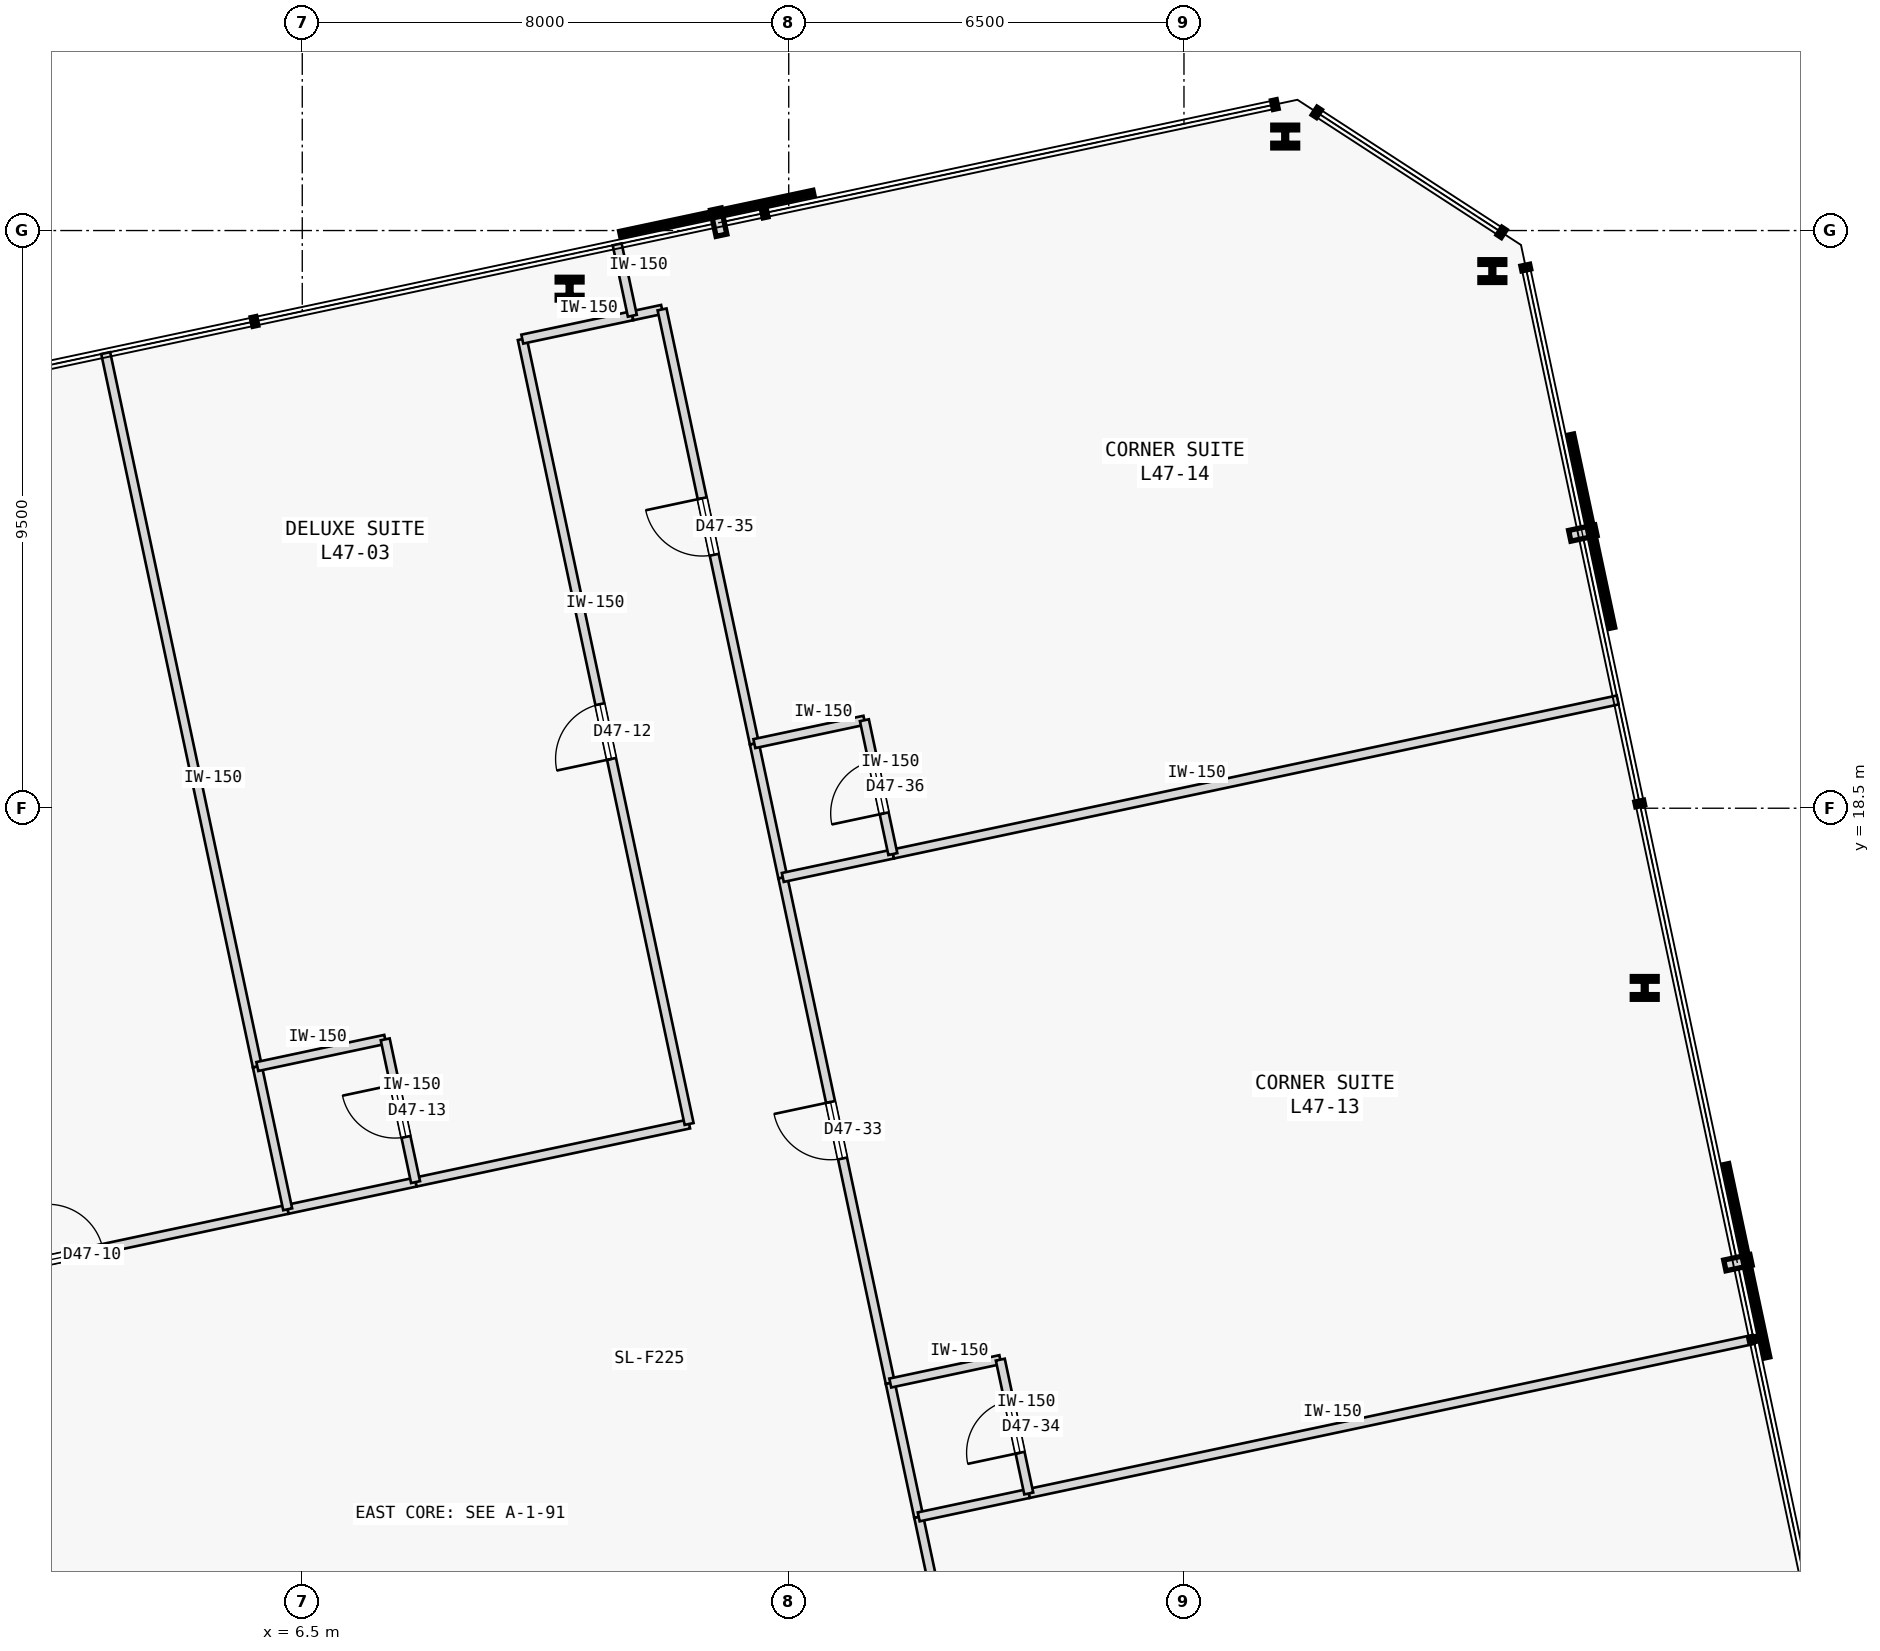
"""IFC4 building model, lengths in metres.
Left out: names, types, materials, properties, quantities, classifications, styles, units other than length and angle.
Written with IfcOpenShell. Run it as: python <this file> out.ifc"""

import sys

from ifc_helpers import new_model, si_unit, direction, frame, frame_2d, origin, origin_2d, place, context, subcontext, project, spatial, rectangle, i_section, extrude, element, fill, save


model = new_model("IFC4")
c1 = context("Model", 3, precision=1e-05, world=origin(), true_north=direction((0.0, 1.0)))
c2 = subcontext(c1, "Body", "Model", "MODEL_VIEW")
j1 = project(units=[si_unit("LENGTHUNIT", "METRE"), si_unit("PLANEANGLEUNIT", "RADIAN")], contexts=[c1])
p1 = place(None, origin())
s1 = spatial("IfcSite", under=j1, at=p1, CompositionType="ELEMENT")
p2 = place(p1, origin())
s2 = spatial("IfcBuilding", under=s1, at=p2, CompositionType="ELEMENT")
p3 = place(p2, frame((0.0, 0.0, 182.0)))
s3 = spatial("IfcBuildingStorey", under=s2, at=p3, CompositionType="ELEMENT", Elevation=182.0)
for number, where, z_axis, x_axis in (
    (1, (28.577, 15.545, 0.0), (0.0, 0.0, 1.0), (1.0, 0.0, 0.0)),
    (2, (26.071, 27.333, 0.0), (0.0, 0.0, 1.0), (1.0, 0.0, 0.0)),
    (3, (22.665, 29.546, 0.0), (0.0, 0.0, 1.0), (1.0, 0.0, 0.0)),
    (4, (10.896, 27.044, 0.0), (0.0, 0.0, 1.0), (1.0, 0.0, 0.0)),
):
    element("IfcColumn", number, at=place(p3, frame(where, z_axis=z_axis, x_axis=x_axis)), inside=s3, PredefinedType="COLUMN", context=c2, shape_type="SweptSolid", body=[
        extrude(i_section(OverallWidth=0.409, OverallDepth=0.374, WebThickness=0.048, FlangeThickness=0.077, FilletRadius=0.015, at=origin_2d()), origin(), (0.0, 0.0, 1.0), 3.4),
    ])
p4 = place(p3, frame((-0.72, 10.421, 0.0), z_axis=(0.0, 0.0, 1.0), x_axis=(0.978147545754, 0.207911949477, 0.0)))
e5 = element("IfcWall", 5, at=p4, inside=s3, PredefinedType="PARTITIONING", context=c2, shape_type="SweptSolid", body=[
    extrude(rectangle(XDim=7.136, YDim=0.15, at=frame_2d((3.568, 0.0))), origin(), (0.0, 0.0, 1.0), 3.175),
])
p5 = place(p4, frame((3.108, 0.0, 0.0)))
e6 = element("IfcOpeningElement", 6, at=p5, cuts=e5, PredefinedType="OPENING", context=c2, shape_type="SweptSolid", body=[
    extrude(rectangle(XDim=0.92, YDim=2.15, at=frame_2d((0.46, 1.075))), frame((0.0, 0.085, 0.0), z_axis=(0.0, -1.0, 0.0), x_axis=(1.0, 0.0, 0.0)), (0.0, 0.0, 1.0), 0.17),
])
p6 = place(p3, frame((8.363, 12.352, 0.0), z_axis=(0.0, 0.0, 1.0), x_axis=(0.978153723809, 0.20788288193, 0.0)))
e7 = element("IfcWall", 7, at=p6, inside=s3, PredefinedType="PARTITIONING", context=c2, shape_type="SweptSolid", body=[
    extrude(rectangle(XDim=4.599, YDim=0.15, at=frame_2d((2.3, 0.0))), origin(), (0.0, 0.0, 1.0), 3.175),
])
p7 = place(p3, frame((12.862, 13.308, 0.0), z_axis=(0.0, 0.0, 1.0), x_axis=(-0.207911421929, 0.978147657888, 0.0)))
e8 = element("IfcWall", 8, at=p7, inside=s3, PredefinedType="PARTITIONING", context=c2, shape_type="SweptSolid", body=[
    extrude(rectangle(XDim=13.195, YDim=0.15, at=frame_2d((6.598, 0.0))), origin(), (0.0, 0.0, 1.0), 3.175),
])
p8 = place(p7, frame((6.137, 0.0, 0.0)))
e9 = element("IfcOpeningElement", 9, at=p8, cuts=e8, PredefinedType="OPENING", context=c2, shape_type="SweptSolid", body=[
    extrude(rectangle(XDim=0.92, YDim=2.15, at=frame_2d((0.46, 1.075))), frame((0.0, 0.085, 0.0), z_axis=(0.0, -1.0, 0.0), x_axis=(1.0, 0.0, 0.0)), (0.0, 0.0, 1.0), 0.17),
])
p9 = place(p3, frame((10.118, 26.214, 0.0), z_axis=(0.0, 0.0, 1.0), x_axis=(0.978133353907, 0.20797870558, 0.0)))
e10 = element("IfcWall", 10, at=p9, inside=s3, PredefinedType="PARTITIONING", context=c2, shape_type="SweptSolid", body=[
    extrude(rectangle(XDim=1.85, YDim=0.15, at=frame_2d((0.925, 0.0))), origin(), (0.0, 0.0, 1.0), 3.175),
])
p10 = place(p3, frame((6.26, 11.905, 0.0), z_axis=(0.0, 0.0, 1.0), x_axis=(0.978146728319, 0.207915795165, 0.0)))
e11 = element("IfcWall", 11, at=p10, inside=s3, PredefinedType="PARTITIONING", context=c2, shape_type="SweptSolid", body=[
    extrude(rectangle(XDim=2.15, YDim=0.15, at=frame_2d((1.075, 0.0))), origin(), (0.0, 0.0, 1.0), 3.175),
])
p11 = place(p3, frame((18.405, -1.468, 0.0), z_axis=(0.0, 0.0, 1.0), x_axis=(-0.207888984761, 0.97815242678, 0.0)))
e12 = element("IfcWall", 12, at=p11, inside=s3, PredefinedType="PARTITIONING", context=c2, shape_type="SweptSolid", body=[
    extrude(rectangle(XDim=8.5, YDim=0.15, at=frame_2d((4.25, 0.0))), origin(), (0.0, 0.0, 1.0), 3.175),
])
p12 = place(p11, frame((3.775, 0.0, 0.0)))
e13 = element("IfcOpeningElement", 13, at=p12, cuts=e12, PredefinedType="OPENING", context=c2, shape_type="SweptSolid", body=[
    extrude(rectangle(XDim=0.95, YDim=2.15, at=frame_2d((0.475, 1.075))), frame((0.0, 0.085, 0.0), z_axis=(0.0, -1.0, 0.0), x_axis=(1.0, 0.0, 0.0)), (0.0, 0.0, 1.0), 0.17),
])
p13 = place(p3, frame((16.17, 9.047, 0.0), z_axis=(0.0, 0.0, 1.0), x_axis=(-0.2079164651, 0.978146585917, 0.0)))
e14 = element("IfcWall", 14, at=p13, inside=s3, PredefinedType="PARTITIONING", context=c2, shape_type="SweptSolid", body=[
    extrude(rectangle(XDim=8.5, YDim=0.15, at=frame_2d((4.25, 0.0))), origin(), (0.0, 0.0, 1.0), 3.175),
])
p14 = place(p13, frame((3.775, 0.0, 0.0)))
e15 = element("IfcOpeningElement", 15, at=p14, cuts=e14, PredefinedType="OPENING", context=c2, shape_type="SweptSolid", body=[
    extrude(rectangle(XDim=0.95, YDim=2.15, at=frame_2d((0.475, 1.075))), frame((0.0, 0.085, 0.0), z_axis=(0.0, -1.0, 0.0), x_axis=(1.0, 0.0, 0.0)), (0.0, 0.0, 1.0), 0.17),
])
p15 = place(p3, frame((16.638, 6.847, 0.0), z_axis=(0.0, 0.0, 1.0), x_axis=(-0.207913264065, 0.978147266328, 0.0)))
e16 = element("IfcWall", 16, at=p15, inside=s3, PredefinedType="PARTITIONING", context=c2, shape_type="SweptSolid", body=[
    extrude(rectangle(XDim=2.25, YDim=0.15, at=frame_2d((1.125, 0.0))), origin(), (0.0, 0.0, 1.0), 3.175),
])
p16 = place(p3, frame((11.928, 26.599, 0.0), z_axis=(0.0, 0.0, 1.0), x_axis=(0.97822210712, 0.207560856478, 0.0)))
e17 = element("IfcWall", 17, at=p16, inside=s3, PredefinedType="PARTITIONING", context=c2, shape_type="SweptSolid", body=[
    extrude(rectangle(XDim=0.5, YDim=0.15, at=frame_2d((0.25, 0.0))), origin(), (0.0, 0.0, 1.0), 3.175),
])
p17 = place(p3, frame((13.935, 19.562, 0.0), z_axis=(0.0, 0.0, 1.0), x_axis=(-0.207923154003, 0.978145164088, 0.0)))
e18 = element("IfcWall", 18, at=p17, inside=s3, PredefinedType="PARTITIONING", context=c2, shape_type="SweptSolid", body=[
    extrude(rectangle(XDim=7.3, YDim=0.15, at=frame_2d((3.65, 0.0))), origin(), (0.0, 0.0, 1.0), 3.175),
])
p18 = place(p17, frame((3.175, 0.0, 0.0)))
e19 = element("IfcOpeningElement", 19, at=p18, cuts=e18, PredefinedType="OPENING", context=c2, shape_type="SweptSolid", body=[
    extrude(rectangle(XDim=0.95, YDim=2.15, at=frame_2d((0.475, 1.075))), frame((0.0, 0.085, 0.0), z_axis=(0.0, -1.0, 0.0), x_axis=(1.0, 0.0, 0.0)), (0.0, 0.0, 1.0), 0.17),
])
p19 = place(p3, frame((14.403, 17.362, 0.0), z_axis=(0.0, 0.0, 1.0), x_axis=(-0.207913264065, 0.978147266328, 0.0)))
e20 = element("IfcWall", 20, at=p19, inside=s3, PredefinedType="PARTITIONING", context=c2, shape_type="SweptSolid", body=[
    extrude(rectangle(XDim=2.25, YDim=0.15, at=frame_2d((1.125, 0.0))), origin(), (0.0, 0.0, 1.0), 3.175),
])
p20 = place(p3, frame((5.761, 14.252, 0.0), z_axis=(0.0, 0.0, 1.0), x_axis=(-0.207910848762, 0.978147779718, 0.0)))
e21 = element("IfcWall", 21, at=p20, inside=s3, PredefinedType="PARTITIONING", context=c2, shape_type="SweptSolid", body=[
    extrude(rectangle(XDim=11.995, YDim=0.15, at=frame_2d((5.998, 0.0))), origin(), (0.0, 0.0, 1.0), 3.175),
])
p21 = place(p3, frame((6.26, 11.905, 0.0), z_axis=(0.0, 0.0, 1.0), x_axis=(-0.207917150959, 0.978146440129, 0.0)))
e22 = element("IfcWall", 22, at=p21, inside=s3, PredefinedType="PARTITIONING", context=c2, shape_type="SweptSolid", body=[
    extrude(rectangle(XDim=2.4, YDim=0.15, at=frame_2d((1.2, 0.0))), origin(), (0.0, 0.0, 1.0), 3.175),
])
p22 = place(p3, frame((5.761, 14.252, 0.0), z_axis=(0.0, 0.0, 1.0), x_axis=(0.978146728319, 0.207915795165, 0.0)))
e23 = element("IfcWall", 23, at=p22, inside=s3, PredefinedType="PARTITIONING", context=c2, shape_type="SweptSolid", body=[
    extrude(rectangle(XDim=2.15, YDim=0.15, at=frame_2d((1.075, 0.0))), origin(), (0.0, 0.0, 1.0), 3.175),
])
p23 = place(p3, frame((8.363, 12.352, 0.0), z_axis=(0.0, 0.0, 1.0), x_axis=(-0.207917150959, 0.978146440129, 0.0)))
e24 = element("IfcWall", 24, at=p23, inside=s3, PredefinedType="PARTITIONING", context=c2, shape_type="SweptSolid", body=[
    extrude(rectangle(XDim=2.4, YDim=0.15, at=frame_2d((1.2, 0.0))), origin(), (0.0, 0.0, 1.0), 3.175),
])
p24 = place(p23, frame((0.76, 0.0, 0.0)))
e25 = element("IfcOpeningElement", 25, at=p24, cuts=e24, PredefinedType="OPENING", context=c2, shape_type="SweptSolid", body=[
    extrude(rectangle(XDim=0.88, YDim=2.15, at=frame_2d((0.44, 1.075))), frame((0.0, 0.085, 0.0), z_axis=(0.0, -1.0, 0.0), x_axis=(1.0, 0.0, 0.0)), (0.0, 0.0, 1.0), 0.17),
])
p25 = place(p3, frame((11.928, 26.599, 0.0), z_axis=(0.0, 0.0, 1.0), x_axis=(-0.20795853359, 0.978137642823, 0.0)))
e26 = element("IfcWall", 26, at=p25, inside=s3, PredefinedType="PARTITIONING", context=c2, shape_type="SweptSolid", body=[
    extrude(rectangle(XDim=1.2, YDim=0.15, at=frame_2d((0.6, 0.0))), origin(), (0.0, 0.0, 1.0), 3.175),
])
p26 = place(p3, frame((18.447, 7.231, 0.0), z_axis=(0.0, 0.0, 1.0), x_axis=(0.978149634612, 0.207902121941, 0.0)))
e27 = element("IfcWall", 27, at=p26, inside=s3, PredefinedType="PARTITIONING", context=c2, shape_type="SweptSolid", body=[
    extrude(rectangle(XDim=12.187, YDim=0.15, at=frame_2d((6.094, 0.0))), origin(), (0.0, 0.0, 1.0), 3.175),
])
p27 = place(p3, frame((16.638, 6.847, 0.0), z_axis=(0.0, 0.0, 1.0), x_axis=(0.978160192495, 0.207852442415, 0.0)))
e28 = element("IfcWall", 28, at=p27, inside=s3, PredefinedType="PARTITIONING", context=c2, shape_type="SweptSolid", body=[
    extrude(rectangle(XDim=1.85, YDim=0.15, at=frame_2d((0.925, 0.0))), origin(), (0.0, 0.0, 1.0), 3.175),
])
p28 = place(p3, frame((16.17, 9.047, 0.0), z_axis=(0.0, 0.0, 1.0), x_axis=(0.978133353907, 0.20797870558, 0.0)))
e29 = element("IfcWall", 29, at=p28, inside=s3, PredefinedType="PARTITIONING", context=c2, shape_type="SweptSolid", body=[
    extrude(rectangle(XDim=1.85, YDim=0.15, at=frame_2d((0.925, 0.0))), origin(), (0.0, 0.0, 1.0), 3.175),
])
p29 = place(p3, frame((18.447, 7.231, 0.0), z_axis=(0.0, 0.0, 1.0), x_axis=(-0.207891197838, 0.978151956427, 0.0)))
e30 = element("IfcWall", 30, at=p29, inside=s3, PredefinedType="PARTITIONING", context=c2, shape_type="SweptSolid", body=[
    extrude(rectangle(XDim=2.25, YDim=0.15, at=frame_2d((1.125, 0.0))), origin(), (0.0, 0.0, 1.0), 3.175),
])
p30 = place(p29, frame((0.685, 0.0, 0.0)))
e31 = element("IfcOpeningElement", 31, at=p30, cuts=e30, PredefinedType="OPENING", context=c2, shape_type="SweptSolid", body=[
    extrude(rectangle(XDim=0.88, YDim=2.15, at=frame_2d((0.44, 1.075))), frame((0.0, 0.085, 0.0), z_axis=(0.0, -1.0, 0.0), x_axis=(1.0, 0.0, 0.0)), (0.0, 0.0, 1.0), 0.17),
])
p31 = place(p3, frame((16.212, 17.746, 0.0), z_axis=(0.0, 0.0, 1.0), x_axis=(0.978149634612, 0.207902121941, 0.0)))
e32 = element("IfcWall", 32, at=p31, inside=s3, PredefinedType="PARTITIONING", context=c2, shape_type="SweptSolid", body=[
    extrude(rectangle(XDim=12.187, YDim=0.15, at=frame_2d((6.094, 0.0))), origin(), (0.0, 0.0, 1.0), 3.175),
])
for number, where, z_axis, x_axis in (
    (33, (14.403, 17.362, 0.0), (0.0, 0.0, 1.0), (0.978, 0.208, 0.0)),
    (34, (13.935, 19.562, 0.0), (0.0, 0.0, 1.0), (0.978, 0.208, 0.0)),
):
    element("IfcWall", number, at=place(p3, frame(where, z_axis=z_axis, x_axis=x_axis)), inside=s3, PredefinedType="PARTITIONING", context=c2, shape_type="SweptSolid", body=[
        extrude(rectangle(XDim=1.85, YDim=0.15, at=frame_2d((0.925, 0.0))), origin(), (0.0, 0.0, 1.0), 3.175),
    ])
p32 = place(p3, frame((16.212, 17.746, 0.0), z_axis=(0.0, 0.0, 1.0), x_axis=(-0.207913264065, 0.978147266328, 0.0)))
e35 = element("IfcWall", 35, at=p32, inside=s3, PredefinedType="PARTITIONING", context=c2, shape_type="SweptSolid", body=[
    extrude(rectangle(XDim=2.25, YDim=0.15, at=frame_2d((1.125, 0.0))), origin(), (0.0, 0.0, 1.0), 3.175),
])
p33 = place(p32, frame((0.685, 0.0, 0.0)))
e36 = element("IfcOpeningElement", 36, at=p33, cuts=e35, PredefinedType="OPENING", context=c2, shape_type="SweptSolid", body=[
    extrude(rectangle(XDim=0.88, YDim=2.15, at=frame_2d((0.44, 1.075))), frame((0.0, 0.085, 0.0), z_axis=(0.0, -1.0, 0.0), x_axis=(1.0, 0.0, 0.0)), (0.0, 0.0, 1.0), 0.17),
])
p34 = place(p5, origin())
e37 = element("IfcDoor", 37, at=p34, inside=s3, OperationType="SINGLE_SWING_LEFT", PredefinedType="DOOR", context=c2, shape_type="SweptSolid", body=[
    extrude(rectangle(XDim=0.92, YDim=2.15, at=frame_2d((0.46, 1.075))), frame((0.0, 0.025, 0.0), z_axis=(0.0, -1.0, 0.0), x_axis=(1.0, 0.0, 0.0)), (0.0, 0.0, 1.0), 0.05),
])
fill(e6, e37)
p35 = place(p8, origin())
e38 = element("IfcDoor", 38, at=p35, inside=s3, OperationType="SINGLE_SWING_LEFT", PredefinedType="DOOR", context=c2, shape_type="SweptSolid", body=[
    extrude(rectangle(XDim=0.92, YDim=2.15, at=frame_2d((0.46, 1.075))), frame((0.0, 0.025, 0.0), z_axis=(0.0, -1.0, 0.0), x_axis=(1.0, 0.0, 0.0)), (0.0, 0.0, 1.0), 0.05),
])
fill(e9, e38)
p36 = place(p24, origin())
e39 = element("IfcDoor", 39, at=p36, inside=s3, OperationType="SINGLE_SWING_RIGHT", PredefinedType="DOOR", context=c2, shape_type="SweptSolid", body=[
    extrude(rectangle(XDim=0.88, YDim=2.15, at=frame_2d((0.44, 1.075))), frame((0.0, 0.025, 0.0), z_axis=(0.0, -1.0, 0.0), x_axis=(1.0, 0.0, 0.0)), (0.0, 0.0, 1.0), 0.05),
])
fill(e25, e39)
p37 = place(p14, origin())
e40 = element("IfcDoor", 40, at=p37, inside=s3, OperationType="SINGLE_SWING_RIGHT", PredefinedType="DOOR", context=c2, shape_type="SweptSolid", body=[
    extrude(rectangle(XDim=0.95, YDim=2.15, at=frame_2d((0.475, 1.075))), frame((0.0, 0.025, 0.0), z_axis=(0.0, -1.0, 0.0), x_axis=(1.0, 0.0, 0.0)), (0.0, 0.0, 1.0), 0.05),
])
fill(e15, e40)
p38 = place(p30, origin())
e41 = element("IfcDoor", 41, at=p38, inside=s3, OperationType="SINGLE_SWING_LEFT", PredefinedType="DOOR", context=c2, shape_type="SweptSolid", body=[
    extrude(rectangle(XDim=0.88, YDim=2.15, at=frame_2d((0.44, 1.075))), frame((0.0, 0.025, 0.0), z_axis=(0.0, -1.0, 0.0), x_axis=(1.0, 0.0, 0.0)), (0.0, 0.0, 1.0), 0.05),
])
fill(e31, e41)
p39 = place(p18, origin())
e42 = element("IfcDoor", 42, at=p39, inside=s3, OperationType="SINGLE_SWING_RIGHT", PredefinedType="DOOR", context=c2, shape_type="SweptSolid", body=[
    extrude(rectangle(XDim=0.95, YDim=2.15, at=frame_2d((0.475, 1.075))), frame((0.0, 0.025, 0.0), z_axis=(0.0, -1.0, 0.0), x_axis=(1.0, 0.0, 0.0)), (0.0, 0.0, 1.0), 0.05),
])
fill(e19, e42)
p40 = place(p33, origin())
e43 = element("IfcDoor", 43, at=p40, inside=s3, OperationType="SINGLE_SWING_LEFT", PredefinedType="DOOR", context=c2, shape_type="SweptSolid", body=[
    extrude(rectangle(XDim=0.88, YDim=2.15, at=frame_2d((0.44, 1.075))), frame((0.0, 0.025, 0.0), z_axis=(0.0, -1.0, 0.0), x_axis=(1.0, 0.0, 0.0)), (0.0, 0.0, 1.0), 0.05),
])
fill(e36, e43)
save(model, sys.argv[1])
